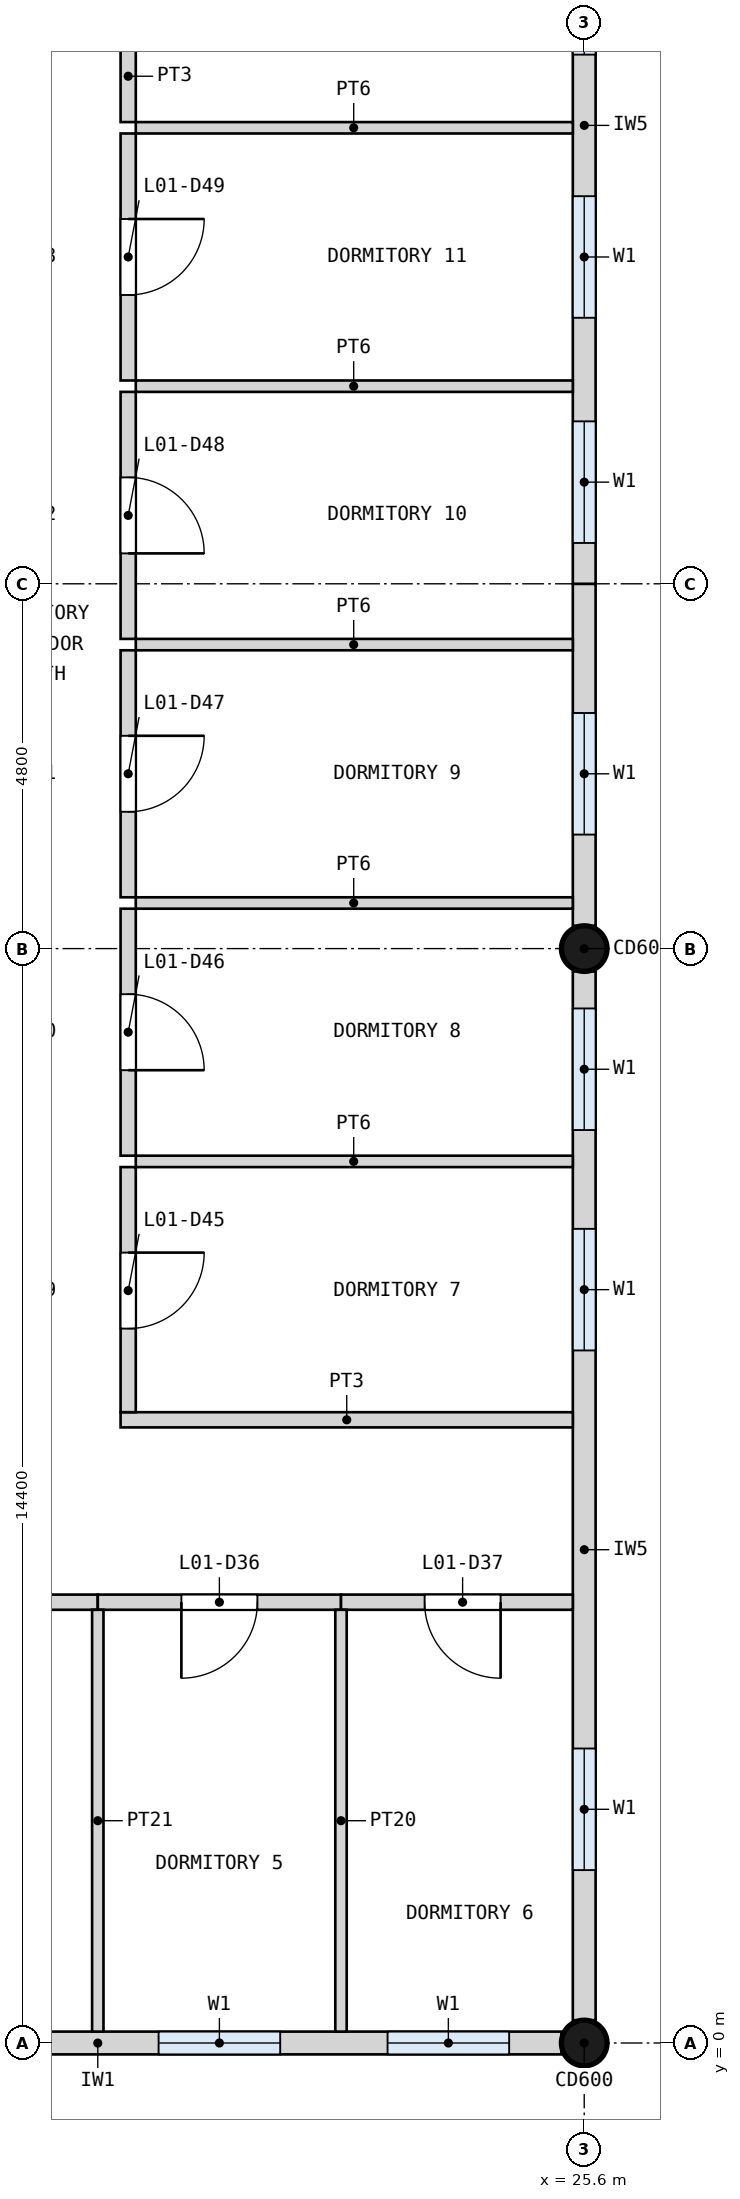
"""IFC4 building model, lengths in metres.
Left out: names, types, materials, properties, quantities, classifications, styles, units other than length and angle.
Written with IfcOpenShell. Run it as: python <this file> out.ifc"""

import sys

from ifc_helpers import new_model, si_unit, direction, frame, frame_2d, origin, origin_2d, place, context, subcontext, project, spatial, rectangle, circle, extrude, element, fill, save


model = new_model("IFC4")
c1 = context("Model", 3, precision=1e-05, world=origin(), true_north=direction((0.0, 1.0)))
c2 = subcontext(c1, "Body", "Model", "MODEL_VIEW")
j1 = project(units=[si_unit("LENGTHUNIT", "METRE"), si_unit("PLANEANGLEUNIT", "RADIAN")], contexts=[c1])
p1 = place(None, origin())
s1 = spatial("IfcSite", under=j1, at=p1, CompositionType="ELEMENT")
p2 = place(p1, origin())
s2 = spatial("IfcBuilding", under=s1, at=p2, CompositionType="ELEMENT")
p3 = place(p2, frame((0.0, 0.0, 4.2)))
s3 = spatial("IfcBuildingStorey", under=s2, at=p3, CompositionType="ELEMENT", Elevation=4.2)
for number, where, z_axis, x_axis in (
    (1, (25.6, 0.0, 0.0), (0.0, 0.0, 1.0), (1.0, 0.0, 0.0)),
    (2, (25.6, 14.4, 0.0), (0.0, 0.0, 1.0), (1.0, 0.0, 0.0)),
):
    element("IfcColumn", number, at=place(p3, frame(where, z_axis=z_axis, x_axis=x_axis)), inside=s3, PredefinedType="COLUMN", context=c2, shape_type="SweptSolid", body=[
        extrude(circle(Radius=0.3, at=origin_2d()), origin(), (0.0, 0.0, 1.0), 4.2),
    ])
p4 = place(p3, frame((13.1, 0.0, 0.0), z_axis=(0.0, 0.0, 1.0), x_axis=(1.0, 0.0, 0.0)))
e3 = element("IfcWall", 3, at=p4, inside=s3, PredefinedType="SOLIDWALL", context=c2, shape_type="SweptSolid", body=[
    extrude(rectangle(XDim=12.2, YDim=0.3, at=frame_2d((6.1, 0.0))), origin(), (0.0, 0.0, 1.0), 3.0),
])
p5 = place(p4, frame((0.688, 0.0, 1.0)))
e4 = element("IfcOpeningElement", 4, at=p5, cuts=e3, PredefinedType="OPENING", context=c2, shape_type="SweptSolid", body=[
    extrude(rectangle(XDim=1.6, YDim=1.8, at=frame_2d((0.8, 0.9))), frame((0.0, 0.16, 0.0), z_axis=(0.0, -1.0, 0.0), x_axis=(1.0, 0.0, 0.0)), (0.0, 0.0, 1.0), 0.32),
])
p6 = place(p4, frame((3.7, 0.0, 1.0)))
e5 = element("IfcOpeningElement", 5, at=p6, cuts=e3, PredefinedType="OPENING", context=c2, shape_type="SweptSolid", body=[
    extrude(rectangle(XDim=1.6, YDim=1.8, at=frame_2d((0.8, 0.9))), frame((0.0, 0.16, 0.0), z_axis=(0.0, -1.0, 0.0), x_axis=(1.0, 0.0, 0.0)), (0.0, 0.0, 1.0), 0.32),
])
p7 = place(p4, frame((6.9, 0.0, 1.0)))
e6 = element("IfcOpeningElement", 6, at=p7, cuts=e3, PredefinedType="OPENING", context=c2, shape_type="SweptSolid", body=[
    extrude(rectangle(XDim=1.6, YDim=1.8, at=frame_2d((0.8, 0.9))), frame((0.0, 0.16, 0.0), z_axis=(0.0, -1.0, 0.0), x_axis=(1.0, 0.0, 0.0)), (0.0, 0.0, 1.0), 0.32),
])
p8 = place(p4, frame((9.913, 0.0, 1.0)))
e7 = element("IfcOpeningElement", 7, at=p8, cuts=e3, PredefinedType="OPENING", context=c2, shape_type="SweptSolid", body=[
    extrude(rectangle(XDim=1.6, YDim=1.8, at=frame_2d((0.8, 0.9))), frame((0.0, 0.16, 0.0), z_axis=(0.0, -1.0, 0.0), x_axis=(1.0, 0.0, 0.0)), (0.0, 0.0, 1.0), 0.32),
])
p9 = place(p3, frame((25.6, 0.3, 0.0), z_axis=(0.0, 0.0, 1.0), x_axis=(0.0, 1.0, 0.0)))
e8 = element("IfcWall", 8, at=p9, inside=s3, PredefinedType="SOLIDWALL", context=c2, shape_type="SweptSolid", body=[
    extrude(rectangle(XDim=13.8, YDim=0.3, at=frame_2d((6.9, 0.0))), origin(), (0.0, 0.0, 1.0), 2.9),
])
p10 = place(p9, frame((1.975, 0.0, 1.0)))
e9 = element("IfcOpeningElement", 9, at=p10, cuts=e8, PredefinedType="OPENING", context=c2, shape_type="SweptSolid", body=[
    extrude(rectangle(XDim=1.6, YDim=1.8, at=frame_2d((0.8, 0.9))), frame((0.0, 0.16, 0.0), z_axis=(0.0, -1.0, 0.0), x_axis=(1.0, 0.0, 0.0)), (0.0, 0.0, 1.0), 0.32),
])
p11 = place(p9, frame((8.812, 0.0, 1.0)))
e10 = element("IfcOpeningElement", 10, at=p11, cuts=e8, PredefinedType="OPENING", context=c2, shape_type="SweptSolid", body=[
    extrude(rectangle(XDim=1.6, YDim=1.8, at=frame_2d((0.8, 0.9))), frame((0.0, 0.16, 0.0), z_axis=(0.0, -1.0, 0.0), x_axis=(1.0, 0.0, 0.0)), (0.0, 0.0, 1.0), 0.32),
])
p12 = place(p9, frame((11.712, 0.0, 1.0)))
e11 = element("IfcOpeningElement", 11, at=p12, cuts=e8, PredefinedType="OPENING", context=c2, shape_type="SweptSolid", body=[
    extrude(rectangle(XDim=1.6, YDim=1.8, at=frame_2d((0.8, 0.9))), frame((0.0, 0.16, 0.0), z_axis=(0.0, -1.0, 0.0), x_axis=(1.0, 0.0, 0.0)), (0.0, 0.0, 1.0), 0.32),
])
p13 = place(p3, frame((25.6, 14.7, 0.0), z_axis=(0.0, 0.0, 1.0), x_axis=(0.0, 1.0, 0.0)))
e12 = element("IfcWall", 12, at=p13, inside=s3, PredefinedType="SOLIDWALL", context=c2, shape_type="SweptSolid", body=[
    extrude(rectangle(XDim=4.5, YDim=0.3, at=frame_2d((2.25, 0.0))), origin(), (0.0, 0.0, 1.0), 2.9),
])
p14 = place(p13, frame((1.2, 0.0, 1.0)))
e13 = element("IfcOpeningElement", 13, at=p14, cuts=e12, PredefinedType="OPENING", context=c2, shape_type="SweptSolid", body=[
    extrude(rectangle(XDim=1.6, YDim=1.8, at=frame_2d((0.8, 0.9))), frame((0.0, 0.16, 0.0), z_axis=(0.0, -1.0, 0.0), x_axis=(1.0, 0.0, 0.0)), (0.0, 0.0, 1.0), 0.32),
])
p15 = place(p3, frame((25.6, 19.2, 0.0), z_axis=(0.0, 0.0, 1.0), x_axis=(0.0, 1.0, 0.0)))
e14 = element("IfcWall", 14, at=p15, inside=s3, PredefinedType="SOLIDWALL", context=c2, shape_type="SweptSolid", body=[
    extrude(rectangle(XDim=9.6, YDim=0.3, at=frame_2d((4.8, 0.0))), origin(), (0.0, 0.0, 1.0), 2.9),
])
p16 = place(p15, frame((0.538, 0.0, 1.0)))
e15 = element("IfcOpeningElement", 15, at=p16, cuts=e14, PredefinedType="OPENING", context=c2, shape_type="SweptSolid", body=[
    extrude(rectangle(XDim=1.6, YDim=1.8, at=frame_2d((0.8, 0.9))), frame((0.0, 0.16, 0.0), z_axis=(0.0, -1.0, 0.0), x_axis=(1.0, 0.0, 0.0)), (0.0, 0.0, 1.0), 0.32),
])
p17 = place(p15, frame((3.5, 0.0, 1.0)))
e16 = element("IfcOpeningElement", 16, at=p17, cuts=e14, PredefinedType="OPENING", context=c2, shape_type="SweptSolid", body=[
    extrude(rectangle(XDim=1.6, YDim=1.8, at=frame_2d((0.8, 0.9))), frame((0.0, 0.16, 0.0), z_axis=(0.0, -1.0, 0.0), x_axis=(1.0, 0.0, 0.0)), (0.0, 0.0, 1.0), 0.32),
])
p18 = place(p15, frame((6.962, 0.0, 1.0)))
e17 = element("IfcOpeningElement", 17, at=p18, cuts=e14, PredefinedType="OPENING", context=c2, shape_type="SweptSolid", body=[
    extrude(rectangle(XDim=1.6, YDim=1.8, at=frame_2d((0.8, 0.9))), frame((0.0, 0.16, 0.0), z_axis=(0.0, -1.0, 0.0), x_axis=(1.0, 0.0, 0.0)), (0.0, 0.0, 1.0), 0.32),
])
p19 = place(p3, frame((16.0, 5.8, 0.0), z_axis=(0.0, 0.0, 1.0), x_axis=(1.0, 0.0, 0.0)))
e18 = element("IfcWall", 18, at=p19, inside=s3, PredefinedType="PARTITIONING", context=c2, shape_type="SweptSolid", body=[
    extrude(rectangle(XDim=3.2, YDim=0.2, at=frame_2d((1.6, 0.0))), origin(), (0.0, 0.0, 1.0), 3.9),
])
p20 = place(p19, frame((1.1, 0.0, 0.0)))
e19 = element("IfcOpeningElement", 19, at=p20, cuts=e18, PredefinedType="OPENING", context=c2, shape_type="SweptSolid", body=[
    extrude(rectangle(XDim=1.0, YDim=2.1, at=frame_2d((0.5, 1.05))), frame((0.0, 0.11, 0.0), z_axis=(0.0, -1.0, 0.0), x_axis=(1.0, 0.0, 0.0)), (0.0, 0.0, 1.0), 0.22),
])
p21 = place(p3, frame((19.2, 5.8, 0.0), z_axis=(0.0, 0.0, 1.0), x_axis=(1.0, 0.0, 0.0)))
e20 = element("IfcWall", 20, at=p21, inside=s3, PredefinedType="PARTITIONING", context=c2, shape_type="SweptSolid", body=[
    extrude(rectangle(XDim=3.2, YDim=0.2, at=frame_2d((1.6, 0.0))), origin(), (0.0, 0.0, 1.0), 3.9),
])
p22 = place(p21, frame((1.1, 0.0, 0.0)))
e21 = element("IfcOpeningElement", 21, at=p22, cuts=e20, PredefinedType="OPENING", context=c2, shape_type="SweptSolid", body=[
    extrude(rectangle(XDim=1.0, YDim=2.1, at=frame_2d((0.5, 1.05))), frame((0.0, 0.11, 0.0), z_axis=(0.0, -1.0, 0.0), x_axis=(1.0, 0.0, 0.0)), (0.0, 0.0, 1.0), 0.22),
])
p23 = place(p3, frame((22.4, 5.8, 0.0), z_axis=(0.0, 0.0, 1.0), x_axis=(1.0, 0.0, 0.0)))
e22 = element("IfcWall", 22, at=p23, inside=s3, PredefinedType="PARTITIONING", context=c2, shape_type="SweptSolid", body=[
    extrude(rectangle(XDim=3.05, YDim=0.2, at=frame_2d((1.525, 0.0))), origin(), (0.0, 0.0, 1.0), 3.9),
])
p24 = place(p23, frame((1.1, 0.0, 0.0)))
e23 = element("IfcOpeningElement", 23, at=p24, cuts=e22, PredefinedType="OPENING", context=c2, shape_type="SweptSolid", body=[
    extrude(rectangle(XDim=1.0, YDim=2.1, at=frame_2d((0.5, 1.05))), frame((0.0, 0.11, 0.0), z_axis=(0.0, -1.0, 0.0), x_axis=(1.0, 0.0, 0.0)), (0.0, 0.0, 1.0), 0.22),
])
p25 = place(p3, frame((19.5, 8.2, 0.0), z_axis=(0.0, 0.0, 1.0), x_axis=(1.0, 0.0, 0.0)))
e24 = element("IfcWall", 24, at=p25, inside=s3, PredefinedType="PARTITIONING", context=c2, shape_type="SweptSolid", body=[
    extrude(rectangle(XDim=5.95, YDim=0.2, at=frame_2d((2.975, 0.0))), origin(), (0.0, 0.0, 1.0), 3.9),
])
for number, where, z_axis, x_axis in (
    (25, (19.7, 11.6, 0.0), (0.0, 0.0, 1.0), (1.0, 0.0, 0.0)),
    (26, (19.7, 15.0, 0.0), (0.0, 0.0, 1.0), (1.0, 0.0, 0.0)),
    (27, (19.7, 18.4, 0.0), (0.0, 0.0, 1.0), (1.0, 0.0, 0.0)),
    (28, (19.7, 21.8, 0.0), (0.0, 0.0, 1.0), (1.0, 0.0, 0.0)),
    (29, (19.7, 25.2, 0.0), (0.0, 0.0, 1.0), (1.0, 0.0, 0.0)),
):
    element("IfcWall", number, at=place(p3, frame(where, z_axis=z_axis, x_axis=x_axis)), inside=s3, PredefinedType="PARTITIONING", context=c2, shape_type="SweptSolid", body=[
        extrude(rectangle(XDim=5.75, YDim=0.15, at=frame_2d((2.875, 0.0))), origin(), (0.0, 0.0, 1.0), 3.9),
    ])
p26 = place(p3, frame((19.2, 0.15, 0.0), z_axis=(0.0, 0.0, 1.0), x_axis=(0.0, 1.0, 0.0)))
e30 = element("IfcWall", 30, at=p26, inside=s3, PredefinedType="PARTITIONING", context=c2, shape_type="SweptSolid", body=[
    extrude(rectangle(XDim=5.55, YDim=0.15, at=frame_2d((2.775, 0.0))), origin(), (0.0, 0.0, 1.0), 2.9),
])
p27 = place(p3, frame((19.6, 8.3, 0.0), z_axis=(0.0, 0.0, 1.0), x_axis=(0.0, 1.0, 0.0)))
e31 = element("IfcWall", 31, at=p27, inside=s3, PredefinedType="PARTITIONING", context=c2, shape_type="SweptSolid", body=[
    extrude(rectangle(XDim=3.225, YDim=0.2, at=frame_2d((1.612, 0.0))), origin(), (0.0, 0.0, 1.0), 3.9),
])
p28 = place(p27, frame((1.1, 0.0, 0.0)))
e32 = element("IfcOpeningElement", 32, at=p28, cuts=e31, PredefinedType="OPENING", context=c2, shape_type="SweptSolid", body=[
    extrude(rectangle(XDim=1.0, YDim=2.1, at=frame_2d((0.5, 1.05))), frame((0.0, 0.11, 0.0), z_axis=(0.0, -1.0, 0.0), x_axis=(1.0, 0.0, 0.0)), (0.0, 0.0, 1.0), 0.22),
])
p29 = place(p3, frame((19.6, 11.675, 0.0), z_axis=(0.0, 0.0, 1.0), x_axis=(0.0, 1.0, 0.0)))
e33 = element("IfcWall", 33, at=p29, inside=s3, PredefinedType="PARTITIONING", context=c2, shape_type="SweptSolid", body=[
    extrude(rectangle(XDim=3.25, YDim=0.2, at=frame_2d((1.625, 0.0))), origin(), (0.0, 0.0, 1.0), 3.9),
])
p30 = place(p29, frame((1.125, 0.0, 0.0)))
e34 = element("IfcOpeningElement", 34, at=p30, cuts=e33, PredefinedType="OPENING", context=c2, shape_type="SweptSolid", body=[
    extrude(rectangle(XDim=1.0, YDim=2.1, at=frame_2d((0.5, 1.05))), frame((0.0, 0.11, 0.0), z_axis=(0.0, -1.0, 0.0), x_axis=(1.0, 0.0, 0.0)), (0.0, 0.0, 1.0), 0.22),
])
p31 = place(p3, frame((19.6, 15.075, 0.0), z_axis=(0.0, 0.0, 1.0), x_axis=(0.0, 1.0, 0.0)))
e35 = element("IfcWall", 35, at=p31, inside=s3, PredefinedType="PARTITIONING", context=c2, shape_type="SweptSolid", body=[
    extrude(rectangle(XDim=3.25, YDim=0.2, at=frame_2d((1.625, 0.0))), origin(), (0.0, 0.0, 1.0), 3.9),
])
p32 = place(p31, frame((1.125, 0.0, 0.0)))
e36 = element("IfcOpeningElement", 36, at=p32, cuts=e35, PredefinedType="OPENING", context=c2, shape_type="SweptSolid", body=[
    extrude(rectangle(XDim=1.0, YDim=2.1, at=frame_2d((0.5, 1.05))), frame((0.0, 0.11, 0.0), z_axis=(0.0, -1.0, 0.0), x_axis=(1.0, 0.0, 0.0)), (0.0, 0.0, 1.0), 0.22),
])
p33 = place(p3, frame((19.6, 18.475, 0.0), z_axis=(0.0, 0.0, 1.0), x_axis=(0.0, 1.0, 0.0)))
e37 = element("IfcWall", 37, at=p33, inside=s3, PredefinedType="PARTITIONING", context=c2, shape_type="SweptSolid", body=[
    extrude(rectangle(XDim=3.25, YDim=0.2, at=frame_2d((1.625, 0.0))), origin(), (0.0, 0.0, 1.0), 3.9),
])
p34 = place(p33, frame((1.125, 0.0, 0.0)))
e38 = element("IfcOpeningElement", 38, at=p34, cuts=e37, PredefinedType="OPENING", context=c2, shape_type="SweptSolid", body=[
    extrude(rectangle(XDim=1.0, YDim=2.1, at=frame_2d((0.5, 1.05))), frame((0.0, 0.11, 0.0), z_axis=(0.0, -1.0, 0.0), x_axis=(1.0, 0.0, 0.0)), (0.0, 0.0, 1.0), 0.22),
])
p35 = place(p3, frame((19.6, 21.875, 0.0), z_axis=(0.0, 0.0, 1.0), x_axis=(0.0, 1.0, 0.0)))
e39 = element("IfcWall", 39, at=p35, inside=s3, PredefinedType="PARTITIONING", context=c2, shape_type="SweptSolid", body=[
    extrude(rectangle(XDim=3.25, YDim=0.2, at=frame_2d((1.625, 0.0))), origin(), (0.0, 0.0, 1.0), 3.9),
])
p36 = place(p35, frame((1.125, 0.0, 0.0)))
e40 = element("IfcOpeningElement", 40, at=p36, cuts=e39, PredefinedType="OPENING", context=c2, shape_type="SweptSolid", body=[
    extrude(rectangle(XDim=1.0, YDim=2.1, at=frame_2d((0.5, 1.05))), frame((0.0, 0.11, 0.0), z_axis=(0.0, -1.0, 0.0), x_axis=(1.0, 0.0, 0.0)), (0.0, 0.0, 1.0), 0.22),
])
p37 = place(p3, frame((19.6, 25.275, 0.0), z_axis=(0.0, 0.0, 1.0), x_axis=(0.0, 1.0, 0.0)))
e41 = element("IfcWall", 41, at=p37, inside=s3, PredefinedType="PARTITIONING", context=c2, shape_type="SweptSolid", body=[
    extrude(rectangle(XDim=3.425, YDim=0.2, at=frame_2d((1.712, 0.0))), origin(), (0.0, 0.0, 1.0), 3.9),
])
p38 = place(p37, frame((1.225, 0.0, 0.0)))
e42 = element("IfcOpeningElement", 42, at=p38, cuts=e41, PredefinedType="OPENING", context=c2, shape_type="SweptSolid", body=[
    extrude(rectangle(XDim=1.0, YDim=2.1, at=frame_2d((0.5, 1.05))), frame((0.0, 0.11, 0.0), z_axis=(0.0, -1.0, 0.0), x_axis=(1.0, 0.0, 0.0)), (0.0, 0.0, 1.0), 0.22),
])
p39 = place(p3, frame((22.4, 0.15, 0.0), z_axis=(0.0, 0.0, 1.0), x_axis=(0.0, 1.0, 0.0)))
e43 = element("IfcWall", 43, at=p39, inside=s3, PredefinedType="PARTITIONING", context=c2, shape_type="SweptSolid", body=[
    extrude(rectangle(XDim=5.55, YDim=0.15, at=frame_2d((2.775, 0.0))), origin(), (0.0, 0.0, 1.0), 3.0),
])
p40 = place(p22, frame((1.0, 0.0, 0.0), z_axis=(0.0, 0.0, 1.0), x_axis=(-1.0, 0.0, 0.0)))
e44 = element("IfcDoor", 44, at=p40, inside=s3, OperationType="SINGLE_SWING_RIGHT", PredefinedType="DOOR", context=c2, shape_type="SweptSolid", body=[
    extrude(rectangle(XDim=1.0, YDim=2.1, at=frame_2d((0.5, 1.05))), frame((0.0, 0.025, 0.0), z_axis=(0.0, -1.0, 0.0), x_axis=(1.0, 0.0, 0.0)), (0.0, 0.0, 1.0), 0.05),
])
fill(e21, e44)
p41 = place(p24, frame((1.0, 0.0, 0.0), z_axis=(0.0, 0.0, 1.0), x_axis=(-1.0, 0.0, 0.0)))
e45 = element("IfcDoor", 45, at=p41, inside=s3, OperationType="SINGLE_SWING_LEFT", PredefinedType="DOOR", context=c2, shape_type="SweptSolid", body=[
    extrude(rectangle(XDim=1.0, YDim=2.1, at=frame_2d((0.5, 1.05))), frame((0.0, 0.025, 0.0), z_axis=(0.0, -1.0, 0.0), x_axis=(1.0, 0.0, 0.0)), (0.0, 0.0, 1.0), 0.05),
])
fill(e23, e45)
p42 = place(p28, frame((1.0, 0.0, 0.0), z_axis=(0.0, 0.0, 1.0), x_axis=(-1.0, 0.0, 0.0)))
e46 = element("IfcDoor", 46, at=p42, inside=s3, OperationType="SINGLE_SWING_LEFT", PredefinedType="DOOR", context=c2, shape_type="SweptSolid", body=[
    extrude(rectangle(XDim=1.0, YDim=2.1, at=frame_2d((0.5, 1.05))), frame((0.0, 0.025, 0.0), z_axis=(0.0, -1.0, 0.0), x_axis=(1.0, 0.0, 0.0)), (0.0, 0.0, 1.0), 0.05),
])
fill(e32, e46)
p43 = place(p30, frame((1.0, 0.0, 0.0), z_axis=(0.0, 0.0, 1.0), x_axis=(-1.0, 0.0, 0.0)))
e47 = element("IfcDoor", 47, at=p43, inside=s3, OperationType="SINGLE_SWING_RIGHT", PredefinedType="DOOR", context=c2, shape_type="SweptSolid", body=[
    extrude(rectangle(XDim=1.0, YDim=2.1, at=frame_2d((0.5, 1.05))), frame((0.0, 0.025, 0.0), z_axis=(0.0, -1.0, 0.0), x_axis=(1.0, 0.0, 0.0)), (0.0, 0.0, 1.0), 0.05),
])
fill(e34, e47)
p44 = place(p32, frame((1.0, 0.0, 0.0), z_axis=(0.0, 0.0, 1.0), x_axis=(-1.0, 0.0, 0.0)))
e48 = element("IfcDoor", 48, at=p44, inside=s3, OperationType="SINGLE_SWING_LEFT", PredefinedType="DOOR", context=c2, shape_type="SweptSolid", body=[
    extrude(rectangle(XDim=1.0, YDim=2.1, at=frame_2d((0.5, 1.05))), frame((0.0, 0.025, 0.0), z_axis=(0.0, -1.0, 0.0), x_axis=(1.0, 0.0, 0.0)), (0.0, 0.0, 1.0), 0.05),
])
fill(e36, e48)
p45 = place(p34, frame((1.0, 0.0, 0.0), z_axis=(0.0, 0.0, 1.0), x_axis=(-1.0, 0.0, 0.0)))
e49 = element("IfcDoor", 49, at=p45, inside=s3, OperationType="SINGLE_SWING_RIGHT", PredefinedType="DOOR", context=c2, shape_type="SweptSolid", body=[
    extrude(rectangle(XDim=1.0, YDim=2.1, at=frame_2d((0.5, 1.05))), frame((0.0, 0.025, 0.0), z_axis=(0.0, -1.0, 0.0), x_axis=(1.0, 0.0, 0.0)), (0.0, 0.0, 1.0), 0.05),
])
fill(e38, e49)
p46 = place(p36, frame((1.0, 0.0, 0.0), z_axis=(0.0, 0.0, 1.0), x_axis=(-1.0, 0.0, 0.0)))
e50 = element("IfcDoor", 50, at=p46, inside=s3, OperationType="SINGLE_SWING_LEFT", PredefinedType="DOOR", context=c2, shape_type="SweptSolid", body=[
    extrude(rectangle(XDim=1.0, YDim=2.1, at=frame_2d((0.5, 1.05))), frame((0.0, 0.025, 0.0), z_axis=(0.0, -1.0, 0.0), x_axis=(1.0, 0.0, 0.0)), (0.0, 0.0, 1.0), 0.05),
])
fill(e40, e50)
p47 = place(p7, origin())
e51 = element("IfcWindow", 51, at=p47, inside=s3, PartitioningType="SINGLE_PANEL", PredefinedType="WINDOW", context=c2, shape_type="SweptSolid", body=[
    extrude(rectangle(XDim=1.6, YDim=1.8, at=frame_2d((0.8, 0.9))), frame((0.0, 0.03, 0.0), z_axis=(0.0, -1.0, 0.0), x_axis=(1.0, 0.0, 0.0)), (0.0, 0.0, 1.0), 0.06),
])
fill(e6, e51)
p48 = place(p8, origin())
e52 = element("IfcWindow", 52, at=p48, inside=s3, PartitioningType="SINGLE_PANEL", PredefinedType="WINDOW", context=c2, shape_type="SweptSolid", body=[
    extrude(rectangle(XDim=1.6, YDim=1.8, at=frame_2d((0.8, 0.9))), frame((0.0, 0.03, 0.0), z_axis=(0.0, -1.0, 0.0), x_axis=(1.0, 0.0, 0.0)), (0.0, 0.0, 1.0), 0.06),
])
fill(e7, e52)
p49 = place(p10, origin())
e53 = element("IfcWindow", 53, at=p49, inside=s3, PartitioningType="SINGLE_PANEL", PredefinedType="WINDOW", context=c2, shape_type="SweptSolid", body=[
    extrude(rectangle(XDim=1.6, YDim=1.8, at=frame_2d((0.8, 0.9))), frame((0.0, 0.03, 0.0), z_axis=(0.0, -1.0, 0.0), x_axis=(1.0, 0.0, 0.0)), (0.0, 0.0, 1.0), 0.06),
])
fill(e9, e53)
p50 = place(p11, origin())
e54 = element("IfcWindow", 54, at=p50, inside=s3, PartitioningType="SINGLE_PANEL", PredefinedType="WINDOW", context=c2, shape_type="SweptSolid", body=[
    extrude(rectangle(XDim=1.6, YDim=1.8, at=frame_2d((0.8, 0.9))), frame((0.0, 0.03, 0.0), z_axis=(0.0, -1.0, 0.0), x_axis=(1.0, 0.0, 0.0)), (0.0, 0.0, 1.0), 0.06),
])
fill(e10, e54)
p51 = place(p12, origin())
e55 = element("IfcWindow", 55, at=p51, inside=s3, PartitioningType="SINGLE_PANEL", PredefinedType="WINDOW", context=c2, shape_type="SweptSolid", body=[
    extrude(rectangle(XDim=1.6, YDim=1.8, at=frame_2d((0.8, 0.9))), frame((0.0, 0.03, 0.0), z_axis=(0.0, -1.0, 0.0), x_axis=(1.0, 0.0, 0.0)), (0.0, 0.0, 1.0), 0.06),
])
fill(e11, e55)
p52 = place(p14, origin())
e56 = element("IfcWindow", 56, at=p52, inside=s3, PartitioningType="SINGLE_PANEL", PredefinedType="WINDOW", context=c2, shape_type="SweptSolid", body=[
    extrude(rectangle(XDim=1.6, YDim=1.8, at=frame_2d((0.8, 0.9))), frame((0.0, 0.03, 0.0), z_axis=(0.0, -1.0, 0.0), x_axis=(1.0, 0.0, 0.0)), (0.0, 0.0, 1.0), 0.06),
])
fill(e13, e56)
p53 = place(p16, origin())
e57 = element("IfcWindow", 57, at=p53, inside=s3, PartitioningType="SINGLE_PANEL", PredefinedType="WINDOW", context=c2, shape_type="SweptSolid", body=[
    extrude(rectangle(XDim=1.6, YDim=1.8, at=frame_2d((0.8, 0.9))), frame((0.0, 0.03, 0.0), z_axis=(0.0, -1.0, 0.0), x_axis=(1.0, 0.0, 0.0)), (0.0, 0.0, 1.0), 0.06),
])
fill(e15, e57)
p54 = place(p17, origin())
e58 = element("IfcWindow", 58, at=p54, inside=s3, PartitioningType="SINGLE_PANEL", PredefinedType="WINDOW", context=c2, shape_type="SweptSolid", body=[
    extrude(rectangle(XDim=1.6, YDim=1.8, at=frame_2d((0.8, 0.9))), frame((0.0, 0.03, 0.0), z_axis=(0.0, -1.0, 0.0), x_axis=(1.0, 0.0, 0.0)), (0.0, 0.0, 1.0), 0.06),
])
fill(e16, e58)
p55 = place(p18, origin())
e59 = element("IfcWindow", 59, at=p55, inside=s3, PartitioningType="SINGLE_PANEL", PredefinedType="WINDOW", context=c2, shape_type="SweptSolid", body=[
    extrude(rectangle(XDim=1.6, YDim=1.8, at=frame_2d((0.8, 0.9))), frame((0.0, 0.03, 0.0), z_axis=(0.0, -1.0, 0.0), x_axis=(1.0, 0.0, 0.0)), (0.0, 0.0, 1.0), 0.06),
])
fill(e17, e59)
save(model, sys.argv[1])
